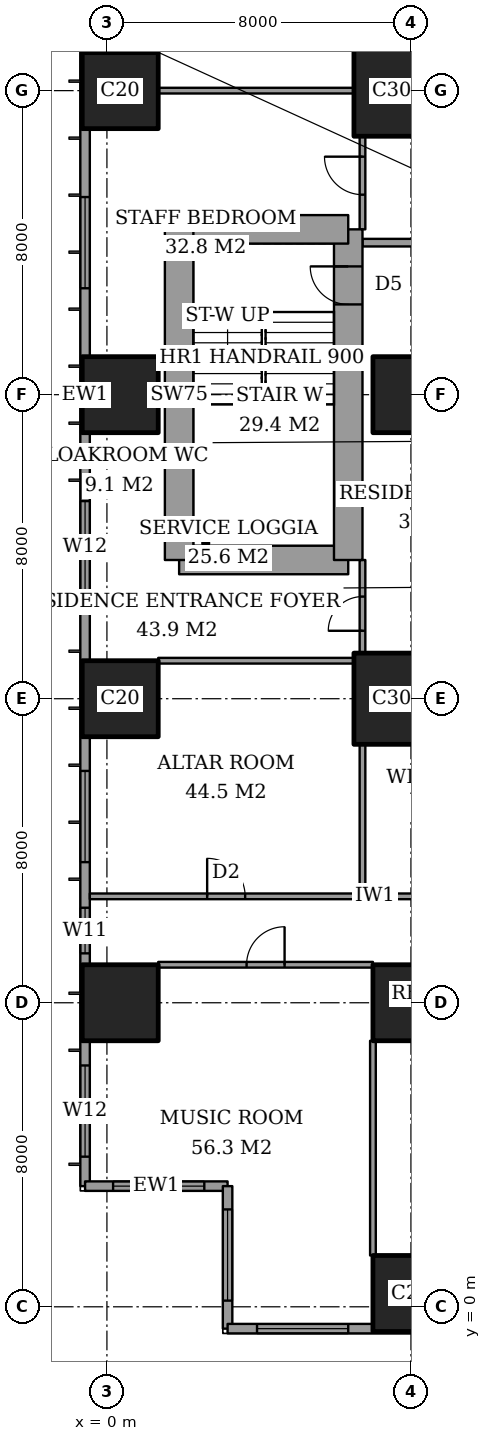
"""IFC4 building model, lengths in metres.
Left out: names, types, materials, properties, quantities, classifications, styles, units other than length and angle.
Written with IfcOpenShell. Run it as: python <this file> out.ifc"""

import sys

from ifc_helpers import new_model, si_unit, direction, frame, frame_2d, origin, origin_2d, place, context, subcontext, project, spatial, rectangle, extrude, element, fill, save


model = new_model("IFC4")
c1 = context("Model", 3, precision=1e-05, world=origin(), true_north=direction((0.0, 1.0)))
c2 = subcontext(c1, "Body", "Model", "MODEL_VIEW")
j1 = project(units=[si_unit("LENGTHUNIT", "METRE"), si_unit("PLANEANGLEUNIT", "RADIAN")], contexts=[c1])
p1 = place(None, origin())
s1 = spatial("IfcSite", under=j1, at=p1, CompositionType="ELEMENT")
p2 = place(p1, origin())
s2 = spatial("IfcBuilding", under=s1, at=p2, CompositionType="ELEMENT")
p3 = place(p2, frame((0.0, 0.0, 103.4)))
s3 = spatial("IfcBuildingStorey", under=s2, at=p3, CompositionType="ELEMENT", Elevation=103.4)
for number, where, z_axis, x_axis in (
    (1, (0.35, 8.0, 0.0), (0.0, 0.0, 1.0), (1.0, 0.0, 0.0)),
    (2, (0.35, 16.0, 0.0), (0.0, 0.0, 1.0), (1.0, 0.0, 0.0)),
    (3, (0.35, 24.0, 0.0), (0.0, 0.0, 1.0), (1.0, 0.0, 0.0)),
    (4, (0.35, 32.0, 0.0), (0.0, 0.0, 1.0), (1.0, 0.0, 0.0)),
    (5, (8.0, 0.35, 0.0), (0.0, 0.0, 1.0), (1.0, 0.0, 0.0)),
    (6, (8.0, 8.0, 0.0), (0.0, 0.0, 1.0), (1.0, 0.0, 0.0)),
):
    element("IfcColumn", number, at=place(p3, frame(where, z_axis=z_axis, x_axis=x_axis)), inside=s3, PredefinedType="COLUMN", context=c2, shape_type="SweptSolid", body=[
        extrude(rectangle(XDim=2.0, YDim=2.0, at=origin_2d()), origin(), (0.0, 0.0, 1.0), 3.6),
    ])
p4 = place(p3, frame((8.0, 16.0, 0.0), z_axis=(0.0, 0.0, 1.0), x_axis=(1.0, 0.0, 0.0)))
e7 = element("IfcColumn", 7, at=p4, inside=s3, PredefinedType="COLUMN", context=c2, shape_type="SweptSolid", body=[
    extrude(rectangle(XDim=3.0, YDim=2.4, at=origin_2d()), origin(), (0.0, 0.0, 1.0), 3.6),
])
p5 = place(p3, frame((8.0, 24.0, 0.0), z_axis=(0.0, 0.0, 1.0), x_axis=(1.0, 0.0, 0.0)))
e8 = element("IfcColumn", 8, at=p5, inside=s3, PredefinedType="COLUMN", context=c2, shape_type="SweptSolid", body=[
    extrude(rectangle(XDim=2.0, YDim=2.0, at=origin_2d()), origin(), (0.0, 0.0, 1.0), 3.6),
])
p6 = place(p3, frame((8.0, 32.0, 0.0), z_axis=(0.0, 0.0, 1.0), x_axis=(1.0, 0.0, 0.0)))
e9 = element("IfcColumn", 9, at=p6, inside=s3, PredefinedType="COLUMN", context=c2, shape_type="SweptSolid", body=[
    extrude(rectangle(XDim=3.0, YDim=2.4, at=origin_2d()), origin(), (0.0, 0.0, 1.0), 3.6),
])
p7 = place(p3, frame((1.9, 19.65, 0.0), z_axis=(0.0, 0.0, 1.0), x_axis=(1.0, 0.0, 0.0)))
e10 = element("IfcWall", 10, at=p7, inside=s3, PredefinedType="SHEAR", context=c2, shape_type="SweptSolid", body=[
    extrude(rectangle(XDim=4.45, YDim=0.75, at=frame_2d((2.225, 0.0))), origin(), (0.0, 0.0, 1.0), 3.6),
])
p8 = place(p3, frame((6.35, 19.65, 0.0), z_axis=(0.0, 0.0, 1.0), x_axis=(0.0, 1.0, 0.0)))
e11 = element("IfcWall", 11, at=p8, inside=s3, PredefinedType="SHEAR", context=c2, shape_type="SweptSolid", body=[
    extrude(rectangle(XDim=8.7, YDim=0.75, at=frame_2d((4.35, 0.0))), origin(), (0.0, 0.0, 1.0), 3.6),
])
p9 = place(p8, frame((6.725, 0.0, 0.0)))
e12 = element("IfcOpeningElement", 12, at=p9, cuts=e11, PredefinedType="OPENING", context=c2, shape_type="SweptSolid", body=[
    extrude(rectangle(XDim=1.0, YDim=2.1, at=frame_2d((0.5, 1.05))), frame((0.0, 0.385, 0.0), z_axis=(0.0, -1.0, 0.0), x_axis=(1.0, 0.0, 0.0)), (0.0, 0.0, 1.0), 0.77),
])
p10 = place(p3, frame((6.35, 28.35, 0.0), z_axis=(0.0, 0.0, 1.0), x_axis=(-1.0, 0.0, 0.0)))
e13 = element("IfcWall", 13, at=p10, inside=s3, PredefinedType="SHEAR", context=c2, shape_type="SweptSolid", body=[
    extrude(rectangle(XDim=4.45, YDim=0.75, at=frame_2d((2.225, 0.0))), origin(), (0.0, 0.0, 1.0), 3.6),
])
p11 = place(p3, frame((1.9, 28.35, 0.0), z_axis=(0.0, 0.0, 1.0), x_axis=(0.0, -1.0, 0.0)))
e14 = element("IfcWall", 14, at=p11, inside=s3, PredefinedType="SHEAR", context=c2, shape_type="SweptSolid", body=[
    extrude(rectangle(XDim=8.7, YDim=0.75, at=frame_2d((4.35, 0.0))), origin(), (0.0, 0.0, 1.0), 3.6),
])
p12 = place(p3, frame((-0.575, 44.825, 0.0), z_axis=(0.0, 0.0, 1.0), x_axis=(0.0, -1.0, 0.0)))
e15 = element("IfcWall", 15, at=p12, inside=s3, PredefinedType="SOLIDWALL", context=c2, shape_type="SweptSolid", body=[
    extrude(rectangle(XDim=41.65, YDim=0.25, at=frame_2d((20.825, 0.0))), origin(), (0.0, 0.0, 1.0), 3.6),
])
p13 = place(p12, frame((0.775, 0.0, 0.4)))
e16 = element("IfcOpeningElement", 16, at=p13, cuts=e15, PredefinedType="OPENING", context=c2, shape_type="SweptSolid", body=[
    extrude(rectangle(XDim=2.4, YDim=2.2, at=frame_2d((1.2, 1.1))), frame((0.0, 0.135, 0.0), z_axis=(0.0, -1.0, 0.0), x_axis=(1.0, 0.0, 0.0)), (0.0, 0.0, 1.0), 0.27),
])
p14 = place(p12, frame((6.1, 0.0, 0.4)))
e17 = element("IfcOpeningElement", 17, at=p14, cuts=e15, PredefinedType="OPENING", context=c2, shape_type="SweptSolid", body=[
    extrude(rectangle(XDim=1.2, YDim=2.2, at=frame_2d((0.6, 1.1))), frame((0.0, 0.135, 0.0), z_axis=(0.0, -1.0, 0.0), x_axis=(1.0, 0.0, 0.0)), (0.0, 0.0, 1.0), 0.27),
])
p15 = place(p12, frame((8.425, 0.0, 0.4)))
e18 = element("IfcOpeningElement", 18, at=p15, cuts=e15, PredefinedType="OPENING", context=c2, shape_type="SweptSolid", body=[
    extrude(rectangle(XDim=2.4, YDim=2.2, at=frame_2d((1.2, 1.1))), frame((0.0, 0.135, 0.0), z_axis=(0.0, -1.0, 0.0), x_axis=(1.0, 0.0, 0.0)), (0.0, 0.0, 1.0), 0.27),
])
p16 = place(p12, frame((15.625, 0.0, 0.4)))
e19 = element("IfcOpeningElement", 19, at=p16, cuts=e15, PredefinedType="OPENING", context=c2, shape_type="SweptSolid", body=[
    extrude(rectangle(XDim=2.4, YDim=2.2, at=frame_2d((1.2, 1.1))), frame((0.0, 0.135, 0.0), z_axis=(0.0, -1.0, 0.0), x_axis=(1.0, 0.0, 0.0)), (0.0, 0.0, 1.0), 0.27),
])
p17 = place(p12, frame((23.625, 0.0, 0.4)))
e20 = element("IfcOpeningElement", 20, at=p17, cuts=e15, PredefinedType="OPENING", context=c2, shape_type="SweptSolid", body=[
    extrude(rectangle(XDim=2.4, YDim=2.2, at=frame_2d((1.2, 1.1))), frame((0.0, 0.135, 0.0), z_axis=(0.0, -1.0, 0.0), x_axis=(1.0, 0.0, 0.0)), (0.0, 0.0, 1.0), 0.27),
])
p18 = place(p12, frame((30.725, 0.0, 0.4)))
e21 = element("IfcOpeningElement", 21, at=p18, cuts=e15, PredefinedType="OPENING", context=c2, shape_type="SweptSolid", body=[
    extrude(rectangle(XDim=2.4, YDim=2.2, at=frame_2d((1.2, 1.1))), frame((0.0, 0.135, 0.0), z_axis=(0.0, -1.0, 0.0), x_axis=(1.0, 0.0, 0.0)), (0.0, 0.0, 1.0), 0.27),
])
p19 = place(p12, frame((34.325, 0.0, 0.4)))
e22 = element("IfcOpeningElement", 22, at=p19, cuts=e15, PredefinedType="OPENING", context=c2, shape_type="SweptSolid", body=[
    extrude(rectangle(XDim=1.2, YDim=2.2, at=frame_2d((0.6, 1.1))), frame((0.0, 0.135, 0.0), z_axis=(0.0, -1.0, 0.0), x_axis=(1.0, 0.0, 0.0)), (0.0, 0.0, 1.0), 0.27),
])
p20 = place(p12, frame((38.475, 0.0, 0.4)))
e23 = element("IfcOpeningElement", 23, at=p20, cuts=e15, PredefinedType="OPENING", context=c2, shape_type="SweptSolid", body=[
    extrude(rectangle(XDim=2.4, YDim=2.2, at=frame_2d((1.2, 1.1))), frame((0.0, 0.135, 0.0), z_axis=(0.0, -1.0, 0.0), x_axis=(1.0, 0.0, 0.0)), (0.0, 0.0, 1.0), 0.27),
])
p21 = place(p3, frame((-0.575, 3.175, 0.0), z_axis=(0.0, 0.0, 1.0), x_axis=(1.0, 0.0, 0.0)))
e24 = element("IfcWall", 24, at=p21, inside=s3, PredefinedType="SOLIDWALL", context=c2, shape_type="SweptSolid", body=[
    extrude(rectangle(XDim=3.75, YDim=0.25, at=frame_2d((1.875, 0.0))), origin(), (0.0, 0.0, 1.0), 3.6),
])
p22 = place(p21, frame((0.738, 0.0, 0.4)))
e25 = element("IfcOpeningElement", 25, at=p22, cuts=e24, PredefinedType="OPENING", context=c2, shape_type="SweptSolid", body=[
    extrude(rectangle(XDim=2.4, YDim=2.2, at=frame_2d((1.2, 1.1))), frame((0.0, 0.135, 0.0), z_axis=(0.0, -1.0, 0.0), x_axis=(1.0, 0.0, 0.0)), (0.0, 0.0, 1.0), 0.27),
])
p23 = place(p3, frame((3.175, 3.175, 0.0), z_axis=(0.0, 0.0, 1.0), x_axis=(0.0, -1.0, 0.0)))
e26 = element("IfcWall", 26, at=p23, inside=s3, PredefinedType="SOLIDWALL", context=c2, shape_type="SweptSolid", body=[
    extrude(rectangle(XDim=3.75, YDim=0.25, at=frame_2d((1.875, 0.0))), origin(), (0.0, 0.0, 1.0), 3.6),
])
p24 = place(p23, frame((0.613, 0.0, 0.4)))
e27 = element("IfcOpeningElement", 27, at=p24, cuts=e26, PredefinedType="OPENING", context=c2, shape_type="SweptSolid", body=[
    extrude(rectangle(XDim=2.4, YDim=2.2, at=frame_2d((1.2, 1.1))), frame((0.0, 0.135, 0.0), z_axis=(0.0, -1.0, 0.0), x_axis=(1.0, 0.0, 0.0)), (0.0, 0.0, 1.0), 0.27),
])
p25 = place(p3, frame((3.175, -0.575, 0.0), z_axis=(0.0, 0.0, 1.0), x_axis=(1.0, 0.0, 0.0)))
e28 = element("IfcWall", 28, at=p25, inside=s3, PredefinedType="SOLIDWALL", context=c2, shape_type="SweptSolid", body=[
    extrude(rectangle(XDim=21.4, YDim=0.25, at=frame_2d((10.7, 0.0))), origin(), (0.0, 0.0, 1.0), 3.6),
])
p26 = place(p25, frame((0.775, 0.0, 0.4)))
e29 = element("IfcOpeningElement", 29, at=p26, cuts=e28, PredefinedType="OPENING", context=c2, shape_type="SweptSolid", body=[
    extrude(rectangle(XDim=2.4, YDim=2.2, at=frame_2d((1.2, 1.1))), frame((0.0, 0.135, 0.0), z_axis=(0.0, -1.0, 0.0), x_axis=(1.0, 0.0, 0.0)), (0.0, 0.0, 1.0), 0.27),
])
p27 = place(p25, frame((7.125, 0.0, 0.4)))
e30 = element("IfcOpeningElement", 30, at=p27, cuts=e28, PredefinedType="OPENING", context=c2, shape_type="SweptSolid", body=[
    extrude(rectangle(XDim=2.4, YDim=2.2, at=frame_2d((1.2, 1.1))), frame((0.0, 0.135, 0.0), z_axis=(0.0, -1.0, 0.0), x_axis=(1.0, 0.0, 0.0)), (0.0, 0.0, 1.0), 0.27),
])
p28 = place(p25, frame((14.225, 0.0, 0.4)))
e31 = element("IfcOpeningElement", 31, at=p28, cuts=e28, PredefinedType="OPENING", context=c2, shape_type="SweptSolid", body=[
    extrude(rectangle(XDim=1.2, YDim=2.2, at=frame_2d((0.6, 1.1))), frame((0.0, 0.135, 0.0), z_axis=(0.0, -1.0, 0.0), x_axis=(1.0, 0.0, 0.0)), (0.0, 0.0, 1.0), 0.27),
])
p29 = place(p25, frame((16.1, 0.0, 0.4)))
e32 = element("IfcOpeningElement", 32, at=p29, cuts=e28, PredefinedType="OPENING", context=c2, shape_type="SweptSolid", body=[
    extrude(rectangle(XDim=1.2, YDim=2.2, at=frame_2d((0.6, 1.1))), frame((0.0, 0.135, 0.0), z_axis=(0.0, -1.0, 0.0), x_axis=(1.0, 0.0, 0.0)), (0.0, 0.0, 1.0), 0.27),
])
p30 = place(p25, frame((17.85, 0.0, 0.4)))
e33 = element("IfcOpeningElement", 33, at=p30, cuts=e28, PredefinedType="OPENING", context=c2, shape_type="SweptSolid", body=[
    extrude(rectangle(XDim=1.2, YDim=2.2, at=frame_2d((0.6, 1.1))), frame((0.0, 0.135, 0.0), z_axis=(0.0, -1.0, 0.0), x_axis=(1.0, 0.0, 0.0)), (0.0, 0.0, 1.0), 0.27),
])
p31 = place(p3, frame((1.35, 9.0, 0.0), z_axis=(0.0, 0.0, 1.0), x_axis=(1.0, 0.0, 0.0)))
e34 = element("IfcWall", 34, at=p31, inside=s3, PredefinedType="PARTITIONING", context=c2, shape_type="SweptSolid", body=[
    extrude(rectangle(XDim=5.65, YDim=0.15, at=frame_2d((2.825, 0.0))), origin(), (0.0, 0.0, 1.0), 3.35),
])
p32 = place(p31, frame((2.325, 0.0, 0.0)))
e35 = element("IfcOpeningElement", 35, at=p32, cuts=e34, PredefinedType="OPENING", context=c2, shape_type="SweptSolid", body=[
    extrude(rectangle(XDim=1.0, YDim=2.1, at=frame_2d((0.5, 1.05))), frame((0.0, 0.085, 0.0), z_axis=(0.0, -1.0, 0.0), x_axis=(1.0, 0.0, 0.0)), (0.0, 0.0, 1.0), 0.17),
])
p33 = place(p3, frame((-0.45, 10.8, 0.0), z_axis=(0.0, 0.0, 1.0), x_axis=(1.0, 0.0, 0.0)))
e36 = element("IfcWall", 36, at=p33, inside=s3, PredefinedType="PARTITIONING", context=c2, shape_type="SweptSolid", body=[
    extrude(rectangle(XDim=25.011, YDim=0.15, at=frame_2d((12.505, 0.0))), origin(), (0.0, 0.0, 1.0), 3.35),
])
p34 = place(p33, frame((12.05, 0.0, 0.0)))
e37 = element("IfcOpeningElement", 37, at=p34, cuts=e36, PredefinedType="OPENING", context=c2, shape_type="SweptSolid", body=[
    extrude(rectangle(XDim=1.0, YDim=2.1, at=frame_2d((0.5, 1.05))), frame((0.0, 0.085, 0.0), z_axis=(0.0, -1.0, 0.0), x_axis=(1.0, 0.0, 0.0)), (0.0, 0.0, 1.0), 0.17),
])
p35 = place(p33, frame((3.087, 0.0, 0.0)))
e38 = element("IfcOpeningElement", 38, at=p35, cuts=e36, PredefinedType="OPENING", context=c2, shape_type="SweptSolid", body=[
    extrude(rectangle(XDim=1.0, YDim=2.1, at=frame_2d((0.5, 1.05))), frame((0.0, 0.085, 0.0), z_axis=(0.0, -1.0, 0.0), x_axis=(1.0, 0.0, 0.0)), (0.0, 0.0, 1.0), 0.17),
])
p36 = place(p33, frame((8.863, 0.0, 0.0)))
e39 = element("IfcOpeningElement", 39, at=p36, cuts=e36, PredefinedType="OPENING", context=c2, shape_type="SweptSolid", body=[
    extrude(rectangle(XDim=0.9, YDim=2.1, at=frame_2d((0.45, 1.05))), frame((0.0, 0.085, 0.0), z_axis=(0.0, -1.0, 0.0), x_axis=(1.0, 0.0, 0.0)), (0.0, 0.0, 1.0), 0.17),
])
p37 = place(p33, frame((14.45, 0.0, 0.0)))
e40 = element("IfcOpeningElement", 40, at=p37, cuts=e36, PredefinedType="OPENING", context=c2, shape_type="SweptSolid", body=[
    extrude(rectangle(XDim=1.0, YDim=2.1, at=frame_2d((0.5, 1.05))), frame((0.0, 0.085, 0.0), z_axis=(0.0, -1.0, 0.0), x_axis=(1.0, 0.0, 0.0)), (0.0, 0.0, 1.0), 0.17),
])
p38 = place(p33, frame((16.9, 0.0, 0.0)))
e41 = element("IfcOpeningElement", 41, at=p38, cuts=e36, PredefinedType="OPENING", context=c2, shape_type="SweptSolid", body=[
    extrude(rectangle(XDim=0.9, YDim=2.1, at=frame_2d((0.45, 1.05))), frame((0.0, 0.085, 0.0), z_axis=(0.0, -1.0, 0.0), x_axis=(1.0, 0.0, 0.0)), (0.0, 0.0, 1.0), 0.17),
])
p39 = place(p33, frame((21.175, 0.0, 0.0)))
e42 = element("IfcOpeningElement", 42, at=p39, cuts=e36, PredefinedType="OPENING", context=c2, shape_type="SweptSolid", body=[
    extrude(rectangle(XDim=1.0, YDim=2.1, at=frame_2d((0.5, 1.05))), frame((0.0, 0.085, 0.0), z_axis=(0.0, -1.0, 0.0), x_axis=(1.0, 0.0, 0.0)), (0.0, 0.0, 1.0), 0.17),
])
p40 = place(p3, frame((1.35, 17.0, 0.0), z_axis=(0.0, 0.0, 1.0), x_axis=(1.0, 0.0, 0.0)))
e43 = element("IfcWall", 43, at=p40, inside=s3, PredefinedType="PARTITIONING", context=c2, shape_type="SweptSolid", body=[
    extrude(rectangle(XDim=5.15, YDim=0.15, at=frame_2d((2.575, 0.0))), origin(), (0.0, 0.0, 1.0), 3.35),
])
p41 = place(p3, frame((6.725, 28.0, 0.0), z_axis=(0.0, 0.0, 1.0), x_axis=(1.0, 0.0, 0.0)))
e44 = element("IfcWall", 44, at=p41, inside=s3, PredefinedType="PARTITIONING", context=c2, shape_type="SweptSolid", body=[
    extrude(rectangle(XDim=17.275, YDim=0.2, at=frame_2d((8.637, 0.0))), origin(), (0.0, 0.0, 1.0), 3.35),
])
p42 = place(p41, frame((6.675, 0.0, 0.0)))
e45 = element("IfcOpeningElement", 45, at=p42, cuts=e44, PredefinedType="OPENING", context=c2, shape_type="SweptSolid", body=[
    extrude(rectangle(XDim=1.2, YDim=2.4, at=frame_2d((0.6, 1.2))), frame((0.0, 0.11, 0.0), z_axis=(0.0, -1.0, 0.0), x_axis=(1.0, 0.0, 0.0)), (0.0, 0.0, 1.0), 0.22),
])
p43 = place(p3, frame((1.35, 32.0, 0.0), z_axis=(0.0, 0.0, 1.0), x_axis=(1.0, 0.0, 0.0)))
e46 = element("IfcWall", 46, at=p43, inside=s3, PredefinedType="PARTITIONING", context=c2, shape_type="SweptSolid", body=[
    extrude(rectangle(XDim=5.15, YDim=0.15, at=frame_2d((2.575, 0.0))), origin(), (0.0, 0.0, 1.0), 2.634),
])
p44 = place(p3, frame((6.725, 10.8, 0.0), z_axis=(0.0, 0.0, 1.0), x_axis=(0.0, 1.0, 0.0)))
e47 = element("IfcWall", 47, at=p44, inside=s3, PredefinedType="PARTITIONING", context=c2, shape_type="SweptSolid", body=[
    extrude(rectangle(XDim=4.0, YDim=0.15, at=frame_2d((2.0, 0.0))), origin(), (0.0, 0.0, 1.0), 3.35),
])
p45 = place(p3, frame((6.725, 17.2, 0.0), z_axis=(0.0, 0.0, 1.0), x_axis=(0.0, 1.0, 0.0)))
e48 = element("IfcWall", 48, at=p45, inside=s3, PredefinedType="PARTITIONING", context=c2, shape_type="SweptSolid", body=[
    extrude(rectangle(XDim=2.45, YDim=0.15, at=frame_2d((1.225, 0.0))), origin(), (0.0, 0.0, 1.0), 3.35),
])
p46 = place(p45, frame((0.587, 0.0, 0.0)))
e49 = element("IfcOpeningElement", 49, at=p46, cuts=e48, PredefinedType="OPENING", context=c2, shape_type="SweptSolid", body=[
    extrude(rectangle(XDim=0.9, YDim=2.1, at=frame_2d((0.45, 1.05))), frame((0.0, 0.085, 0.0), z_axis=(0.0, -1.0, 0.0), x_axis=(1.0, 0.0, 0.0)), (0.0, 0.0, 1.0), 0.17),
])
p47 = place(p3, frame((6.725, 28.35, 0.0), z_axis=(0.0, 0.0, 1.0), x_axis=(0.0, 1.0, 0.0)))
e50 = element("IfcWall", 50, at=p47, inside=s3, PredefinedType="PARTITIONING", context=c2, shape_type="SweptSolid", body=[
    extrude(rectangle(XDim=2.45, YDim=0.15, at=frame_2d((1.225, 0.0))), origin(), (0.0, 0.0, 1.0), 3.35),
])
p48 = place(p47, frame((0.913, 0.0, 0.0)))
e51 = element("IfcOpeningElement", 51, at=p48, cuts=e50, PredefinedType="OPENING", context=c2, shape_type="SweptSolid", body=[
    extrude(rectangle(XDim=1.0, YDim=2.1, at=frame_2d((0.5, 1.05))), frame((0.0, 0.085, 0.0), z_axis=(0.0, -1.0, 0.0), x_axis=(1.0, 0.0, 0.0)), (0.0, 0.0, 1.0), 0.17),
])
p49 = place(p3, frame((7.0, 1.35, 0.0), z_axis=(0.0, 0.0, 1.0), x_axis=(0.0, 1.0, 0.0)))
e52 = element("IfcWall", 52, at=p49, inside=s3, PredefinedType="PARTITIONING", context=c2, shape_type="SweptSolid", body=[
    extrude(rectangle(XDim=5.65, YDim=0.15, at=frame_2d((2.825, 0.0))), origin(), (0.0, 0.0, 1.0), 3.35),
])
p50 = place(p16, origin())
e53 = element("IfcWindow", 53, at=p50, inside=s3, PartitioningType="SINGLE_PANEL", PredefinedType="WINDOW", context=c2, shape_type="SweptSolid", body=[
    extrude(rectangle(XDim=2.4, YDim=2.2, at=frame_2d((1.2, 1.1))), frame((0.0, 0.03, 0.0), z_axis=(0.0, -1.0, 0.0), x_axis=(1.0, 0.0, 0.0)), (0.0, 0.0, 1.0), 0.06),
])
fill(e19, e53)
p51 = place(p17, origin())
e54 = element("IfcWindow", 54, at=p51, inside=s3, PartitioningType="SINGLE_PANEL", PredefinedType="WINDOW", context=c2, shape_type="SweptSolid", body=[
    extrude(rectangle(XDim=2.4, YDim=2.2, at=frame_2d((1.2, 1.1))), frame((0.0, 0.03, 0.0), z_axis=(0.0, -1.0, 0.0), x_axis=(1.0, 0.0, 0.0)), (0.0, 0.0, 1.0), 0.06),
])
fill(e20, e54)
p52 = place(p18, origin())
e55 = element("IfcWindow", 55, at=p52, inside=s3, PartitioningType="SINGLE_PANEL", PredefinedType="WINDOW", context=c2, shape_type="SweptSolid", body=[
    extrude(rectangle(XDim=2.4, YDim=2.2, at=frame_2d((1.2, 1.1))), frame((0.0, 0.03, 0.0), z_axis=(0.0, -1.0, 0.0), x_axis=(1.0, 0.0, 0.0)), (0.0, 0.0, 1.0), 0.06),
])
fill(e21, e55)
p53 = place(p19, origin())
e56 = element("IfcWindow", 56, at=p53, inside=s3, PartitioningType="SINGLE_PANEL", PredefinedType="WINDOW", context=c2, shape_type="SweptSolid", body=[
    extrude(rectangle(XDim=1.2, YDim=2.2, at=frame_2d((0.6, 1.1))), frame((0.0, 0.03, 0.0), z_axis=(0.0, -1.0, 0.0), x_axis=(1.0, 0.0, 0.0)), (0.0, 0.0, 1.0), 0.06),
])
fill(e22, e56)
p54 = place(p20, origin())
e57 = element("IfcWindow", 57, at=p54, inside=s3, PartitioningType="SINGLE_PANEL", PredefinedType="WINDOW", context=c2, shape_type="SweptSolid", body=[
    extrude(rectangle(XDim=2.4, YDim=2.2, at=frame_2d((1.2, 1.1))), frame((0.0, 0.03, 0.0), z_axis=(0.0, -1.0, 0.0), x_axis=(1.0, 0.0, 0.0)), (0.0, 0.0, 1.0), 0.06),
])
fill(e23, e57)
p55 = place(p22, origin())
e58 = element("IfcWindow", 58, at=p55, inside=s3, PartitioningType="SINGLE_PANEL", PredefinedType="WINDOW", context=c2, shape_type="SweptSolid", body=[
    extrude(rectangle(XDim=2.4, YDim=2.2, at=frame_2d((1.2, 1.1))), frame((0.0, 0.03, 0.0), z_axis=(0.0, -1.0, 0.0), x_axis=(1.0, 0.0, 0.0)), (0.0, 0.0, 1.0), 0.06),
])
fill(e25, e58)
p56 = place(p24, origin())
e59 = element("IfcWindow", 59, at=p56, inside=s3, PartitioningType="SINGLE_PANEL", PredefinedType="WINDOW", context=c2, shape_type="SweptSolid", body=[
    extrude(rectangle(XDim=2.4, YDim=2.2, at=frame_2d((1.2, 1.1))), frame((0.0, 0.03, 0.0), z_axis=(0.0, -1.0, 0.0), x_axis=(1.0, 0.0, 0.0)), (0.0, 0.0, 1.0), 0.06),
])
fill(e27, e59)
p57 = place(p26, origin())
e60 = element("IfcWindow", 60, at=p57, inside=s3, PartitioningType="SINGLE_PANEL", PredefinedType="WINDOW", context=c2, shape_type="SweptSolid", body=[
    extrude(rectangle(XDim=2.4, YDim=2.2, at=frame_2d((1.2, 1.1))), frame((0.0, 0.03, 0.0), z_axis=(0.0, -1.0, 0.0), x_axis=(1.0, 0.0, 0.0)), (0.0, 0.0, 1.0), 0.06),
])
fill(e29, e60)
p58 = place(p32, origin())
e61 = element("IfcDoor", 61, at=p58, inside=s3, OperationType="SINGLE_SWING_LEFT", PredefinedType="DOOR", context=c2, shape_type="SweptSolid", body=[
    extrude(rectangle(XDim=1.0, YDim=2.1, at=frame_2d((0.5, 1.05))), frame((0.0, 0.025, 0.0), z_axis=(0.0, -1.0, 0.0), x_axis=(1.0, 0.0, 0.0)), (0.0, 0.0, 1.0), 0.05),
])
fill(e35, e61)
p59 = place(p35, origin())
e62 = element("IfcDoor", 62, at=p59, inside=s3, OperationType="SINGLE_SWING_RIGHT", PredefinedType="DOOR", context=c2, shape_type="SweptSolid", body=[
    extrude(rectangle(XDim=1.0, YDim=2.1, at=frame_2d((0.5, 1.05))), frame((0.0, 0.025, 0.0), z_axis=(0.0, -1.0, 0.0), x_axis=(1.0, 0.0, 0.0)), (0.0, 0.0, 1.0), 0.05),
])
fill(e38, e62)
p60 = place(p46, origin())
e63 = element("IfcDoor", 63, at=p60, inside=s3, OperationType="SINGLE_SWING_RIGHT", PredefinedType="DOOR", context=c2, shape_type="SweptSolid", body=[
    extrude(rectangle(XDim=0.9, YDim=2.1, at=frame_2d((0.45, 1.05))), frame((0.0, 0.025, 0.0), z_axis=(0.0, -1.0, 0.0), x_axis=(1.0, 0.0, 0.0)), (0.0, 0.0, 1.0), 0.05),
])
fill(e49, e63)
p61 = place(p48, origin())
e64 = element("IfcDoor", 64, at=p61, inside=s3, OperationType="SINGLE_SWING_LEFT", PredefinedType="DOOR", context=c2, shape_type="SweptSolid", body=[
    extrude(rectangle(XDim=1.0, YDim=2.1, at=frame_2d((0.5, 1.05))), frame((0.0, 0.025, 0.0), z_axis=(0.0, -1.0, 0.0), x_axis=(1.0, 0.0, 0.0)), (0.0, 0.0, 1.0), 0.05),
])
fill(e51, e64)
p62 = place(p9, origin())
e65 = element("IfcDoor", 65, at=p62, inside=s3, OperationType="SINGLE_SWING_LEFT", PredefinedType="DOOR", context=c2, shape_type="SweptSolid", body=[
    extrude(rectangle(XDim=1.0, YDim=2.1, at=frame_2d((0.5, 1.05))), frame((0.0, 0.025, 0.0), z_axis=(0.0, -1.0, 0.0), x_axis=(1.0, 0.0, 0.0)), (0.0, 0.0, 1.0), 0.05),
])
fill(e12, e65)
save(model, sys.argv[1])
